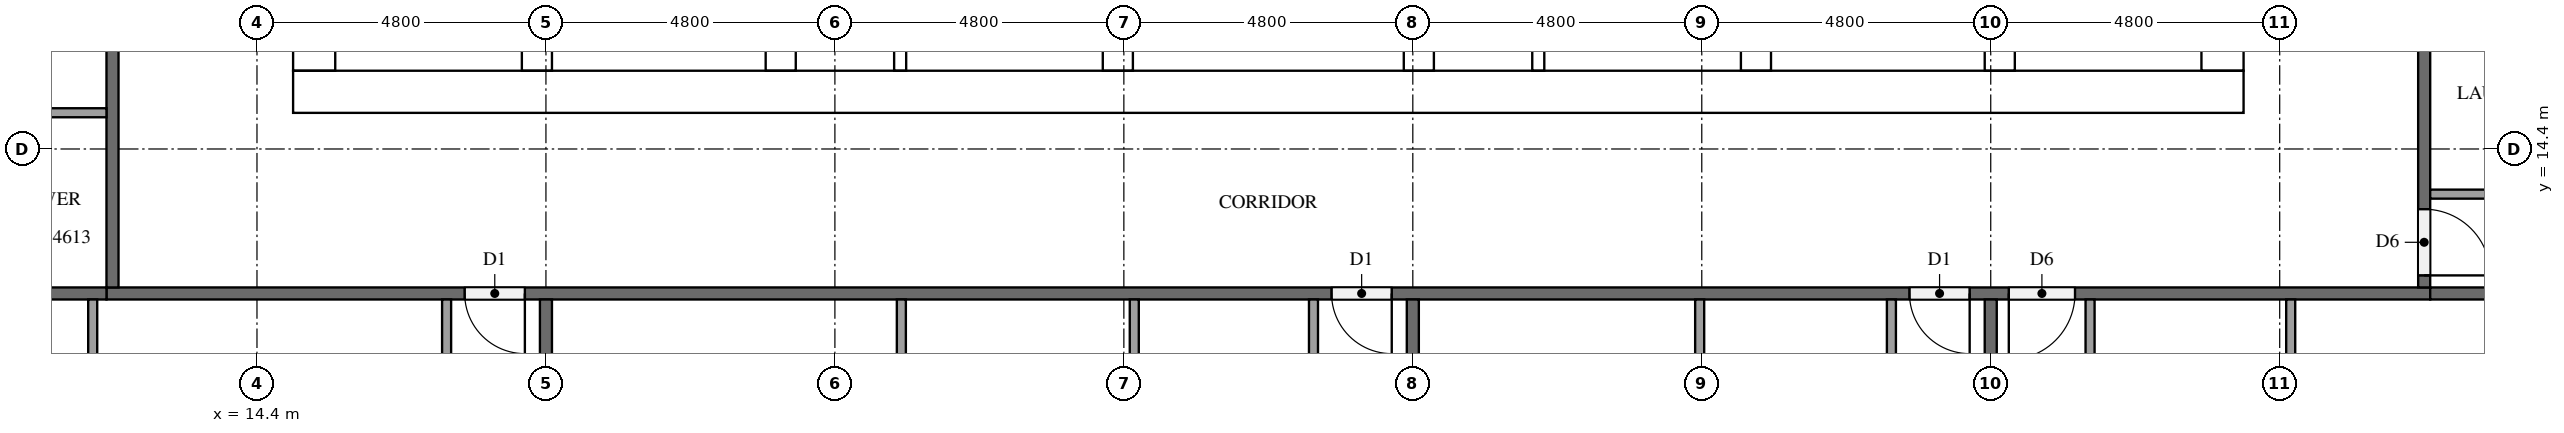
"""IFC4 building model, lengths in metres.
Left out: names, types, materials, properties, quantities, classifications, styles, units other than length and angle.
Written with IfcOpenShell. Run it as: python <this file> out.ifc"""

import sys

from ifc_helpers import new_model, si_unit, direction, frame, frame_2d, origin, place, context, subcontext, project, spatial, rectangle, extrude, element, fill, save


model = new_model("IFC4")
c1 = context("Model", 3, precision=1e-05, world=origin(), true_north=direction((0.0, 1.0)))
c2 = subcontext(c1, "Body", "Model", "MODEL_VIEW")
j1 = project(units=[si_unit("LENGTHUNIT", "METRE"), si_unit("PLANEANGLEUNIT", "RADIAN")], contexts=[c1])
p1 = place(None, origin())
s1 = spatial("IfcSite", under=j1, at=p1, CompositionType="ELEMENT")
p2 = place(p1, origin())
s2 = spatial("IfcBuilding", under=s1, at=p2, CompositionType="ELEMENT")
p3 = place(p2, frame((0.0, 0.0, 178.9)))
s3 = spatial("IfcBuildingStorey", under=s2, at=p3, CompositionType="ELEMENT", Elevation=178.9)
p4 = place(p3, frame((15.0, 15.35, 0.0), z_axis=(0.0, 0.0, 1.0), x_axis=(1.0, 0.0, 0.0)))
e1 = element("IfcWall", 1, at=p4, inside=s3, PredefinedType="SHEAR", context=c2, shape_type="SweptSolid", body=[
    extrude(rectangle(XDim=32.4, YDim=0.7, at=frame_2d((16.2, 0.0))), origin(), (0.0, 0.0, 1.0), 3.2),
])
p5 = place(p4, frame((15.3, 0.0, 0.0)))
e2 = element("IfcOpeningElement", 2, at=p5, cuts=e1, PredefinedType="OPENING", context=c2, shape_type="SweptSolid", body=[
    extrude(rectangle(XDim=1.8, YDim=2.1, at=frame_2d((0.9, 1.05))), frame((0.0, 0.36, 0.0), z_axis=(0.0, -1.0, 0.0), x_axis=(1.0, 0.0, 0.0)), (0.0, 0.0, 1.0), 0.72),
])
p6 = place(p3, frame((15.35, 15.7, 0.0), z_axis=(0.0, 0.0, 1.0), x_axis=(0.0, 1.0, 0.0)))
e3 = element("IfcWall", 3, at=p6, inside=s3, PredefinedType="SHEAR", context=c2, shape_type="SweptSolid", body=[
    extrude(rectangle(XDim=21.4, YDim=0.7, at=frame_2d((10.7, 0.0))), origin(), (0.0, 0.0, 1.0), 3.2),
])
p7 = place(p6, frame((5.06, 0.0, 0.0)))
e4 = element("IfcOpeningElement", 4, at=p7, cuts=e3, PredefinedType="OPENING", context=c2, shape_type="SweptSolid", body=[
    extrude(rectangle(XDim=1.2, YDim=2.1, at=frame_2d((0.6, 1.05))), frame((0.0, 0.36, 0.0), z_axis=(0.0, -1.0, 0.0), x_axis=(1.0, 0.0, 0.0)), (0.0, 0.0, 1.0), 0.72),
])
p8 = place(p3, frame((47.05, 15.7, 0.0), z_axis=(0.0, 0.0, 1.0), x_axis=(0.0, 1.0, 0.0)))
e5 = element("IfcWall", 5, at=p8, inside=s3, PredefinedType="SHEAR", context=c2, shape_type="SweptSolid", body=[
    extrude(rectangle(XDim=21.4, YDim=0.7, at=frame_2d((10.7, 0.0))), origin(), (0.0, 0.0, 1.0), 3.2),
])
p9 = place(p8, frame((10.4, 0.0, 0.0)))
e6 = element("IfcOpeningElement", 6, at=p9, cuts=e5, PredefinedType="OPENING", context=c2, shape_type="SweptSolid", body=[
    extrude(rectangle(XDim=1.2, YDim=2.1, at=frame_2d((0.6, 1.05))), frame((0.0, 0.36, 0.0), z_axis=(0.0, -1.0, 0.0), x_axis=(1.0, 0.0, 0.0)), (0.0, 0.0, 1.0), 0.72),
])
p10 = place(p3, frame((19.05, 15.7, 0.0), z_axis=(0.0, 0.0, 1.0), x_axis=(0.0, 1.0, 0.0)))
e7 = element("IfcWall", 7, at=p10, inside=s3, PredefinedType="SHEAR", context=c2, shape_type="SweptSolid", body=[
    extrude(rectangle(XDim=15.3, YDim=0.5, at=frame_2d((7.65, 0.0))), origin(), (0.0, 0.0, 1.0), 3.2),
])
p11 = place(p10, frame((9.75, 0.0, 0.0)))
e8 = element("IfcOpeningElement", 8, at=p11, cuts=e7, PredefinedType="OPENING", context=c2, shape_type="SweptSolid", body=[
    extrude(rectangle(XDim=1.1, YDim=2.1, at=frame_2d((0.55, 1.05))), frame((0.0, 0.26, 0.0), z_axis=(0.0, -1.0, 0.0), x_axis=(1.0, 0.0, 0.0)), (0.0, 0.0, 1.0), 0.52),
])
p12 = place(p10, frame((13.25, 0.0, 0.0)))
e9 = element("IfcOpeningElement", 9, at=p12, cuts=e7, PredefinedType="OPENING", context=c2, shape_type="SweptSolid", body=[
    extrude(rectangle(XDim=1.1, YDim=2.1, at=frame_2d((0.55, 1.05))), frame((0.0, 0.26, 0.0), z_axis=(0.0, -1.0, 0.0), x_axis=(1.0, 0.0, 0.0)), (0.0, 0.0, 1.0), 0.52),
])
p13 = place(p10, frame((0.5, 0.0, 0.0)))
e10 = element("IfcOpeningElement", 10, at=p13, cuts=e7, PredefinedType="OPENING", context=c2, shape_type="SweptSolid", body=[
    extrude(rectangle(XDim=1.2, YDim=2.1, at=frame_2d((0.6, 1.05))), frame((0.0, 0.26, 0.0), z_axis=(0.0, -1.0, 0.0), x_axis=(1.0, 0.0, 0.0)), (0.0, 0.0, 1.0), 0.52),
])
p14 = place(p3, frame((23.1, 15.7, 0.0), z_axis=(0.0, 0.0, 1.0), x_axis=(0.0, 1.0, 0.0)))
e11 = element("IfcWall", 11, at=p14, inside=s3, PredefinedType="SHEAR", context=c2, shape_type="SweptSolid", body=[
    extrude(rectangle(XDim=21.4, YDim=0.5, at=frame_2d((10.7, 0.0))), origin(), (0.0, 0.0, 1.0), 3.2),
])
p15 = place(p3, frame((39.3, 15.7, 0.0), z_axis=(0.0, 0.0, 1.0), x_axis=(0.0, 1.0, 0.0)))
e12 = element("IfcWall", 12, at=p15, inside=s3, PredefinedType="SHEAR", context=c2, shape_type="SweptSolid", body=[
    extrude(rectangle(XDim=8.55, YDim=0.5, at=frame_2d((4.275, 0.0))), origin(), (0.0, 0.0, 1.0), 3.2),
])
p16 = place(p3, frame((43.35, 15.7, 0.0), z_axis=(0.0, 0.0, 1.0), x_axis=(0.0, 1.0, 0.0)))
e13 = element("IfcWall", 13, at=p16, inside=s3, PredefinedType="SHEAR", context=c2, shape_type="SweptSolid", body=[
    extrude(rectangle(XDim=8.55, YDim=0.5, at=frame_2d((4.275, 0.0))), origin(), (0.0, 0.0, 1.0), 3.2),
])
p17 = place(p16, frame((0.5, 0.0, 0.0)))
e14 = element("IfcOpeningElement", 14, at=p17, cuts=e13, PredefinedType="OPENING", context=c2, shape_type="SweptSolid", body=[
    extrude(rectangle(XDim=1.2, YDim=2.1, at=frame_2d((0.6, 1.05))), frame((0.0, 0.26, 0.0), z_axis=(0.0, -1.0, 0.0), x_axis=(1.0, 0.0, 0.0)), (0.0, 0.0, 1.0), 0.52),
])
for number, where, z_axis, x_axis in (
    (15, (28.7, 15.7, 0.0), (0.0, 0.0, 1.0), (0.0, 1.0, 0.0)),
    (16, (33.7, 15.7, 0.0), (0.0, 0.0, 1.0), (0.0, 1.0, 0.0)),
):
    element("IfcWall", number, at=place(p3, frame(where, z_axis=z_axis, x_axis=x_axis)), inside=s3, PredefinedType="SHEAR", context=c2, shape_type="SweptSolid", body=[
        extrude(rectangle(XDim=2.8, YDim=0.5, at=frame_2d((1.4, 0.0))), origin(), (0.0, 0.0, 1.0), 3.2),
    ])
for number, where, z_axis, x_axis in (
    (17, (25.084, 15.7, 0.0), (0.0, 0.0, 1.0), (0.0, 1.0, 0.0)),
    (18, (35.684, 15.7, 0.0), (0.0, 0.0, 1.0), (0.0, 1.0, 0.0)),
):
    element("IfcWall", number, at=place(p3, frame(where, z_axis=z_axis, x_axis=x_axis)), inside=s3, PredefinedType="PARTITIONING", context=c2, shape_type="SweptSolid", body=[
        extrude(rectangle(XDim=2.8, YDim=0.2, at=frame_2d((1.4, 0.0))), origin(), (0.0, 0.0, 1.0), 3.2),
    ])
p18 = place(p3, frame((50.5, 12.0, 0.0), z_axis=(0.0, 0.0, 1.0), x_axis=(-1.0, 0.0, 0.0)))
e19 = element("IfcWall", 19, at=p18, inside=s3, PredefinedType="PARTITIONING", context=c2, shape_type="SweptSolid", body=[
    extrude(rectangle(XDim=38.6, YDim=0.2, at=frame_2d((19.3, 0.0))), origin(), (0.0, 0.0, 1.0), 3.2),
])
p19 = place(p18, frame((31.65, 0.0, 0.0)))
e20 = element("IfcOpeningElement", 20, at=p19, cuts=e19, PredefinedType="OPENING", context=c2, shape_type="SweptSolid", body=[
    extrude(rectangle(XDim=1.0, YDim=2.1, at=frame_2d((0.5, 1.05))), frame((0.0, 0.11, 0.0), z_axis=(0.0, -1.0, 0.0), x_axis=(1.0, 0.0, 0.0)), (0.0, 0.0, 1.0), 0.22),
])
p20 = place(p18, frame((17.25, 0.0, 0.0)))
e21 = element("IfcOpeningElement", 21, at=p20, cuts=e19, PredefinedType="OPENING", context=c2, shape_type="SweptSolid", body=[
    extrude(rectangle(XDim=1.0, YDim=2.1, at=frame_2d((0.5, 1.05))), frame((0.0, 0.11, 0.0), z_axis=(0.0, -1.0, 0.0), x_axis=(1.0, 0.0, 0.0)), (0.0, 0.0, 1.0), 0.22),
])
p21 = place(p18, frame((7.65, 0.0, 0.0)))
e22 = element("IfcOpeningElement", 22, at=p21, cuts=e19, PredefinedType="OPENING", context=c2, shape_type="SweptSolid", body=[
    extrude(rectangle(XDim=1.0, YDim=2.1, at=frame_2d((0.5, 1.05))), frame((0.0, 0.11, 0.0), z_axis=(0.0, -1.0, 0.0), x_axis=(1.0, 0.0, 0.0)), (0.0, 0.0, 1.0), 0.22),
])
p22 = place(p18, frame((5.9, 0.0, 0.0)))
e23 = element("IfcOpeningElement", 23, at=p22, cuts=e19, PredefinedType="OPENING", context=c2, shape_type="SweptSolid", body=[
    extrude(rectangle(XDim=1.1, YDim=2.1, at=frame_2d((0.55, 1.05))), frame((0.0, 0.11, 0.0), z_axis=(0.0, -1.0, 0.0), x_axis=(1.0, 0.0, 0.0)), (0.0, 0.0, 1.0), 0.22),
])
p23 = place(p3, frame((50.4, 40.7, 0.0), z_axis=(0.0, 0.0, 1.0), x_axis=(0.0, -1.0, 0.0)))
e24 = element("IfcWall", 24, at=p23, inside=s3, PredefinedType="PARTITIONING", context=c2, shape_type="SweptSolid", body=[
    extrude(rectangle(XDim=28.6, YDim=0.2, at=frame_2d((14.3, 0.0))), origin(), (0.0, 0.0, 1.0), 3.2),
])
p24 = place(p23, frame((27.3, 0.0, 0.0)))
e25 = element("IfcOpeningElement", 25, at=p24, cuts=e24, PredefinedType="OPENING", context=c2, shape_type="SweptSolid", body=[
    extrude(rectangle(XDim=1.1, YDim=2.1, at=frame_2d((0.55, 1.05))), frame((0.0, 0.11, 0.0), z_axis=(0.0, -1.0, 0.0), x_axis=(1.0, 0.0, 0.0)), (0.0, 0.0, 1.0), 0.22),
])
p25 = place(p23, frame((8.15, 0.0, 0.0)))
e26 = element("IfcOpeningElement", 26, at=p25, cuts=e24, PredefinedType="OPENING", context=c2, shape_type="SweptSolid", body=[
    extrude(rectangle(XDim=1.0, YDim=2.1, at=frame_2d((0.5, 1.05))), frame((0.0, 0.11, 0.0), z_axis=(0.0, -1.0, 0.0), x_axis=(1.0, 0.0, 0.0)), (0.0, 0.0, 1.0), 0.22),
])
p26 = place(p23, frame((0.95, 0.0, 0.0)))
e27 = element("IfcOpeningElement", 27, at=p26, cuts=e24, PredefinedType="OPENING", context=c2, shape_type="SweptSolid", body=[
    extrude(rectangle(XDim=1.0, YDim=2.1, at=frame_2d((0.5, 1.05))), frame((0.0, 0.11, 0.0), z_axis=(0.0, -1.0, 0.0), x_axis=(1.0, 0.0, 0.0)), (0.0, 0.0, 1.0), 0.22),
])
p27 = place(p3, frame((12.0, 12.1, 0.0), z_axis=(0.0, 0.0, 1.0), x_axis=(0.0, 1.0, 0.0)))
e28 = element("IfcWall", 28, at=p27, inside=s3, PredefinedType="PARTITIONING", context=c2, shape_type="SweptSolid", body=[
    extrude(rectangle(XDim=28.6, YDim=0.2, at=frame_2d((14.3, 0.0))), origin(), (0.0, 0.0, 1.0), 3.2),
])
p28 = place(p27, frame((26.65, 0.0, 0.0)))
e29 = element("IfcOpeningElement", 29, at=p28, cuts=e28, PredefinedType="OPENING", context=c2, shape_type="SweptSolid", body=[
    extrude(rectangle(XDim=1.0, YDim=2.1, at=frame_2d((0.5, 1.05))), frame((0.0, 0.11, 0.0), z_axis=(0.0, -1.0, 0.0), x_axis=(1.0, 0.0, 0.0)), (0.0, 0.0, 1.0), 0.22),
])
p29 = place(p27, frame((24.95, 0.0, 0.0)))
e30 = element("IfcOpeningElement", 30, at=p29, cuts=e28, PredefinedType="OPENING", context=c2, shape_type="SweptSolid", body=[
    extrude(rectangle(XDim=1.0, YDim=2.1, at=frame_2d((0.5, 1.05))), frame((0.0, 0.11, 0.0), z_axis=(0.0, -1.0, 0.0), x_axis=(1.0, 0.0, 0.0)), (0.0, 0.0, 1.0), 0.22),
])
p30 = place(p27, frame((12.95, 0.0, 0.0)))
e31 = element("IfcOpeningElement", 31, at=p30, cuts=e28, PredefinedType="OPENING", context=c2, shape_type="SweptSolid", body=[
    extrude(rectangle(XDim=1.0, YDim=2.1, at=frame_2d((0.5, 1.05))), frame((0.0, 0.11, 0.0), z_axis=(0.0, -1.0, 0.0), x_axis=(1.0, 0.0, 0.0)), (0.0, 0.0, 1.0), 0.22),
])
p31 = place(p3, frame((19.2, 11.9, 0.0), z_axis=(0.0, 0.0, 1.0), x_axis=(0.0, -1.0, 0.0)))
e32 = element("IfcWall", 32, at=p31, inside=s3, PredefinedType="PARTITIONING", context=c2, shape_type="SweptSolid", body=[
    extrude(rectangle(XDim=11.575, YDim=0.2, at=frame_2d((5.788, 0.0))), origin(), (0.0, 0.0, 1.0), 3.2),
])
p32 = place(p3, frame((4.9, 12.0, 0.0), z_axis=(0.0, 0.0, 1.0), x_axis=(1.0, 0.0, 0.0)))
e33 = element("IfcWall", 33, at=p32, inside=s3, PredefinedType="PARTITIONING", context=c2, shape_type="SweptSolid", body=[
    extrude(rectangle(XDim=7.0, YDim=0.2, at=frame_2d((3.5, 0.0))), origin(), (0.0, 0.0, 1.0), 3.2),
])
for number, where, z_axis, x_axis in (
    (34, (33.6, 11.9, 0.0), (0.0, 0.0, 1.0), (0.0, -1.0, 0.0)),
    (35, (43.2, 11.9, 0.0), (0.0, 0.0, 1.0), (0.0, -1.0, 0.0)),
):
    element("IfcWall", number, at=place(p3, frame(where, z_axis=z_axis, x_axis=x_axis)), inside=s3, PredefinedType="PARTITIONING", context=c2, shape_type="SweptSolid", body=[
        extrude(rectangle(XDim=11.8, YDim=0.2, at=frame_2d((5.9, 0.0))), origin(), (0.0, 0.0, 1.0), 3.2),
    ])
p33 = place(p3, frame((50.5, 12.0, 0.0), z_axis=(0.0, 0.0, 1.0), x_axis=(1.0, 0.0, 0.0)))
e36 = element("IfcWall", 36, at=p33, inside=s3, PredefinedType="PARTITIONING", context=c2, shape_type="SweptSolid", body=[
    extrude(rectangle(XDim=11.8, YDim=0.2, at=frame_2d((5.9, 0.0))), origin(), (0.0, 0.0, 1.0), 3.2),
])
p34 = place(p3, frame((11.671, 11.9, 0.0), z_axis=(0.0, 0.0, 1.0), x_axis=(0.0, -1.0, 0.0)))
e37 = element("IfcWall", 37, at=p34, inside=s3, PredefinedType="PARTITIONING", context=c2, shape_type="SweptSolid", body=[
    extrude(rectangle(XDim=4.325, YDim=0.15, at=frame_2d((2.163, 0.0))), origin(), (0.0, 0.0, 1.0), 3.2),
])
p35 = place(p3, frame((17.55, 11.9, 0.0), z_axis=(0.0, 0.0, 1.0), x_axis=(0.0, -1.0, 0.0)))
e38 = element("IfcWall", 38, at=p35, inside=s3, PredefinedType="PARTITIONING", context=c2, shape_type="SweptSolid", body=[
    extrude(rectangle(XDim=4.475, YDim=0.15, at=frame_2d((2.237, 0.0))), origin(), (0.0, 0.0, 1.0), 3.2),
])
for number, where, z_axis, x_axis in (
    (39, (28.973, 11.9, 0.0), (0.0, 0.0, 1.0), (0.0, -1.0, 0.0)),
    (40, (25.104, 11.9, 0.0), (0.0, 0.0, 1.0), (0.0, -1.0, 0.0)),
):
    element("IfcWall", number, at=place(p3, frame(where, z_axis=z_axis, x_axis=x_axis)), inside=s3, PredefinedType="PARTITIONING", context=c2, shape_type="SweptSolid", body=[
        extrude(rectangle(XDim=3.575, YDim=0.15, at=frame_2d((1.788, 0.0))), origin(), (0.0, 0.0, 1.0), 3.2),
    ])
for number, where, z_axis, x_axis in (
    (41, (31.95, 11.9, 0.0), (0.0, 0.0, 1.0), (0.0, -1.0, 0.0)),
    (42, (38.365, 11.9, 0.0), (0.0, 0.0, 1.0), (0.0, -1.0, 0.0)),
):
    element("IfcWall", number, at=place(p3, frame(where, z_axis=z_axis, x_axis=x_axis)), inside=s3, PredefinedType="PARTITIONING", context=c2, shape_type="SweptSolid", body=[
        extrude(rectangle(XDim=3.725, YDim=0.15, at=frame_2d((1.862, 0.0))), origin(), (0.0, 0.0, 1.0), 3.2),
    ])
p36 = place(p3, frame((41.55, 11.9, 0.0), z_axis=(0.0, 0.0, 1.0), x_axis=(0.0, -1.0, 0.0)))
e43 = element("IfcWall", 43, at=p36, inside=s3, PredefinedType="PARTITIONING", context=c2, shape_type="SweptSolid", body=[
    extrude(rectangle(XDim=3.875, YDim=0.15, at=frame_2d((1.938, 0.0))), origin(), (0.0, 0.0, 1.0), 3.2),
])
p37 = place(p3, frame((48.183, 11.9, 0.0), z_axis=(0.0, 0.0, 1.0), x_axis=(0.0, -1.0, 0.0)))
e44 = element("IfcWall", 44, at=p37, inside=s3, PredefinedType="PARTITIONING", context=c2, shape_type="SweptSolid", body=[
    extrude(rectangle(XDim=4.325, YDim=0.15, at=frame_2d((2.163, 0.0))), origin(), (0.0, 0.0, 1.0), 3.2),
])
p38 = place(p3, frame((44.85, 11.9, 0.0), z_axis=(0.0, 0.0, 1.0), x_axis=(0.0, -1.0, 0.0)))
e45 = element("IfcWall", 45, at=p38, inside=s3, PredefinedType="PARTITIONING", context=c2, shape_type="SweptSolid", body=[
    extrude(rectangle(XDim=4.475, YDim=0.15, at=frame_2d((2.237, 0.0))), origin(), (0.0, 0.0, 1.0), 3.2),
])
p39 = place(p3, frame((50.5, 13.65, 0.0), z_axis=(0.0, 0.0, 1.0), x_axis=(1.0, 0.0, 0.0)))
e46 = element("IfcWall", 46, at=p39, inside=s3, PredefinedType="PARTITIONING", context=c2, shape_type="SweptSolid", body=[
    extrude(rectangle(XDim=3.275, YDim=0.15, at=frame_2d((1.637, 0.0))), origin(), (0.0, 0.0, 1.0), 3.2),
])
p40 = place(p3, frame((11.9, 15.002, 0.0), z_axis=(0.0, 0.0, 1.0), x_axis=(-1.0, 0.0, 0.0)))
e47 = element("IfcWall", 47, at=p40, inside=s3, PredefinedType="PARTITIONING", context=c2, shape_type="SweptSolid", body=[
    extrude(rectangle(XDim=2.225, YDim=0.15, at=frame_2d((1.112, 0.0))), origin(), (0.0, 0.0, 1.0), 3.2),
])
p41 = place(p5, frame((1.8, 0.0, 0.0), z_axis=(0.0, 0.0, 1.0), x_axis=(-1.0, 0.0, 0.0)))
e48 = element("IfcDoor", 48, at=p41, inside=s3, OperationType="DOUBLE_DOOR_SINGLE_SWING", PredefinedType="DOOR", context=c2, shape_type="SweptSolid", body=[
    extrude(rectangle(XDim=1.8, YDim=2.1, at=frame_2d((0.9, 1.05))), frame((0.0, 0.025, 0.0), z_axis=(0.0, -1.0, 0.0), x_axis=(1.0, 0.0, 0.0)), (0.0, 0.0, 1.0), 0.05),
])
fill(e2, e48)
p42 = place(p19, origin())
e49 = element("IfcDoor", 49, at=p42, inside=s3, OperationType="SINGLE_SWING_LEFT", PredefinedType="DOOR", context=c2, shape_type="SweptSolid", body=[
    extrude(rectangle(XDim=1.0, YDim=2.1, at=frame_2d((0.5, 1.05))), frame((0.0, 0.025, 0.0), z_axis=(0.0, -1.0, 0.0), x_axis=(1.0, 0.0, 0.0)), (0.0, 0.0, 1.0), 0.05),
])
fill(e20, e49)
p43 = place(p20, origin())
e50 = element("IfcDoor", 50, at=p43, inside=s3, OperationType="SINGLE_SWING_LEFT", PredefinedType="DOOR", context=c2, shape_type="SweptSolid", body=[
    extrude(rectangle(XDim=1.0, YDim=2.1, at=frame_2d((0.5, 1.05))), frame((0.0, 0.025, 0.0), z_axis=(0.0, -1.0, 0.0), x_axis=(1.0, 0.0, 0.0)), (0.0, 0.0, 1.0), 0.05),
])
fill(e21, e50)
p44 = place(p21, origin())
e51 = element("IfcDoor", 51, at=p44, inside=s3, OperationType="SINGLE_SWING_LEFT", PredefinedType="DOOR", context=c2, shape_type="SweptSolid", body=[
    extrude(rectangle(XDim=1.0, YDim=2.1, at=frame_2d((0.5, 1.05))), frame((0.0, 0.025, 0.0), z_axis=(0.0, -1.0, 0.0), x_axis=(1.0, 0.0, 0.0)), (0.0, 0.0, 1.0), 0.05),
])
fill(e22, e51)
p45 = place(p22, origin())
e52 = element("IfcDoor", 52, at=p45, inside=s3, OperationType="SINGLE_SWING_RIGHT", PredefinedType="DOOR", context=c2, shape_type="SweptSolid", body=[
    extrude(rectangle(XDim=1.1, YDim=2.1, at=frame_2d((0.55, 1.05))), frame((0.0, 0.025, 0.0), z_axis=(0.0, -1.0, 0.0), x_axis=(1.0, 0.0, 0.0)), (0.0, 0.0, 1.0), 0.05),
])
fill(e23, e52)
p46 = place(p24, origin())
e53 = element("IfcDoor", 53, at=p46, inside=s3, OperationType="SINGLE_SWING_RIGHT", PredefinedType="DOOR", context=c2, shape_type="SweptSolid", body=[
    extrude(rectangle(XDim=1.1, YDim=2.1, at=frame_2d((0.55, 1.05))), frame((0.0, 0.025, 0.0), z_axis=(0.0, -1.0, 0.0), x_axis=(1.0, 0.0, 0.0)), (0.0, 0.0, 1.0), 0.05),
])
fill(e25, e53)
save(model, sys.argv[1])
